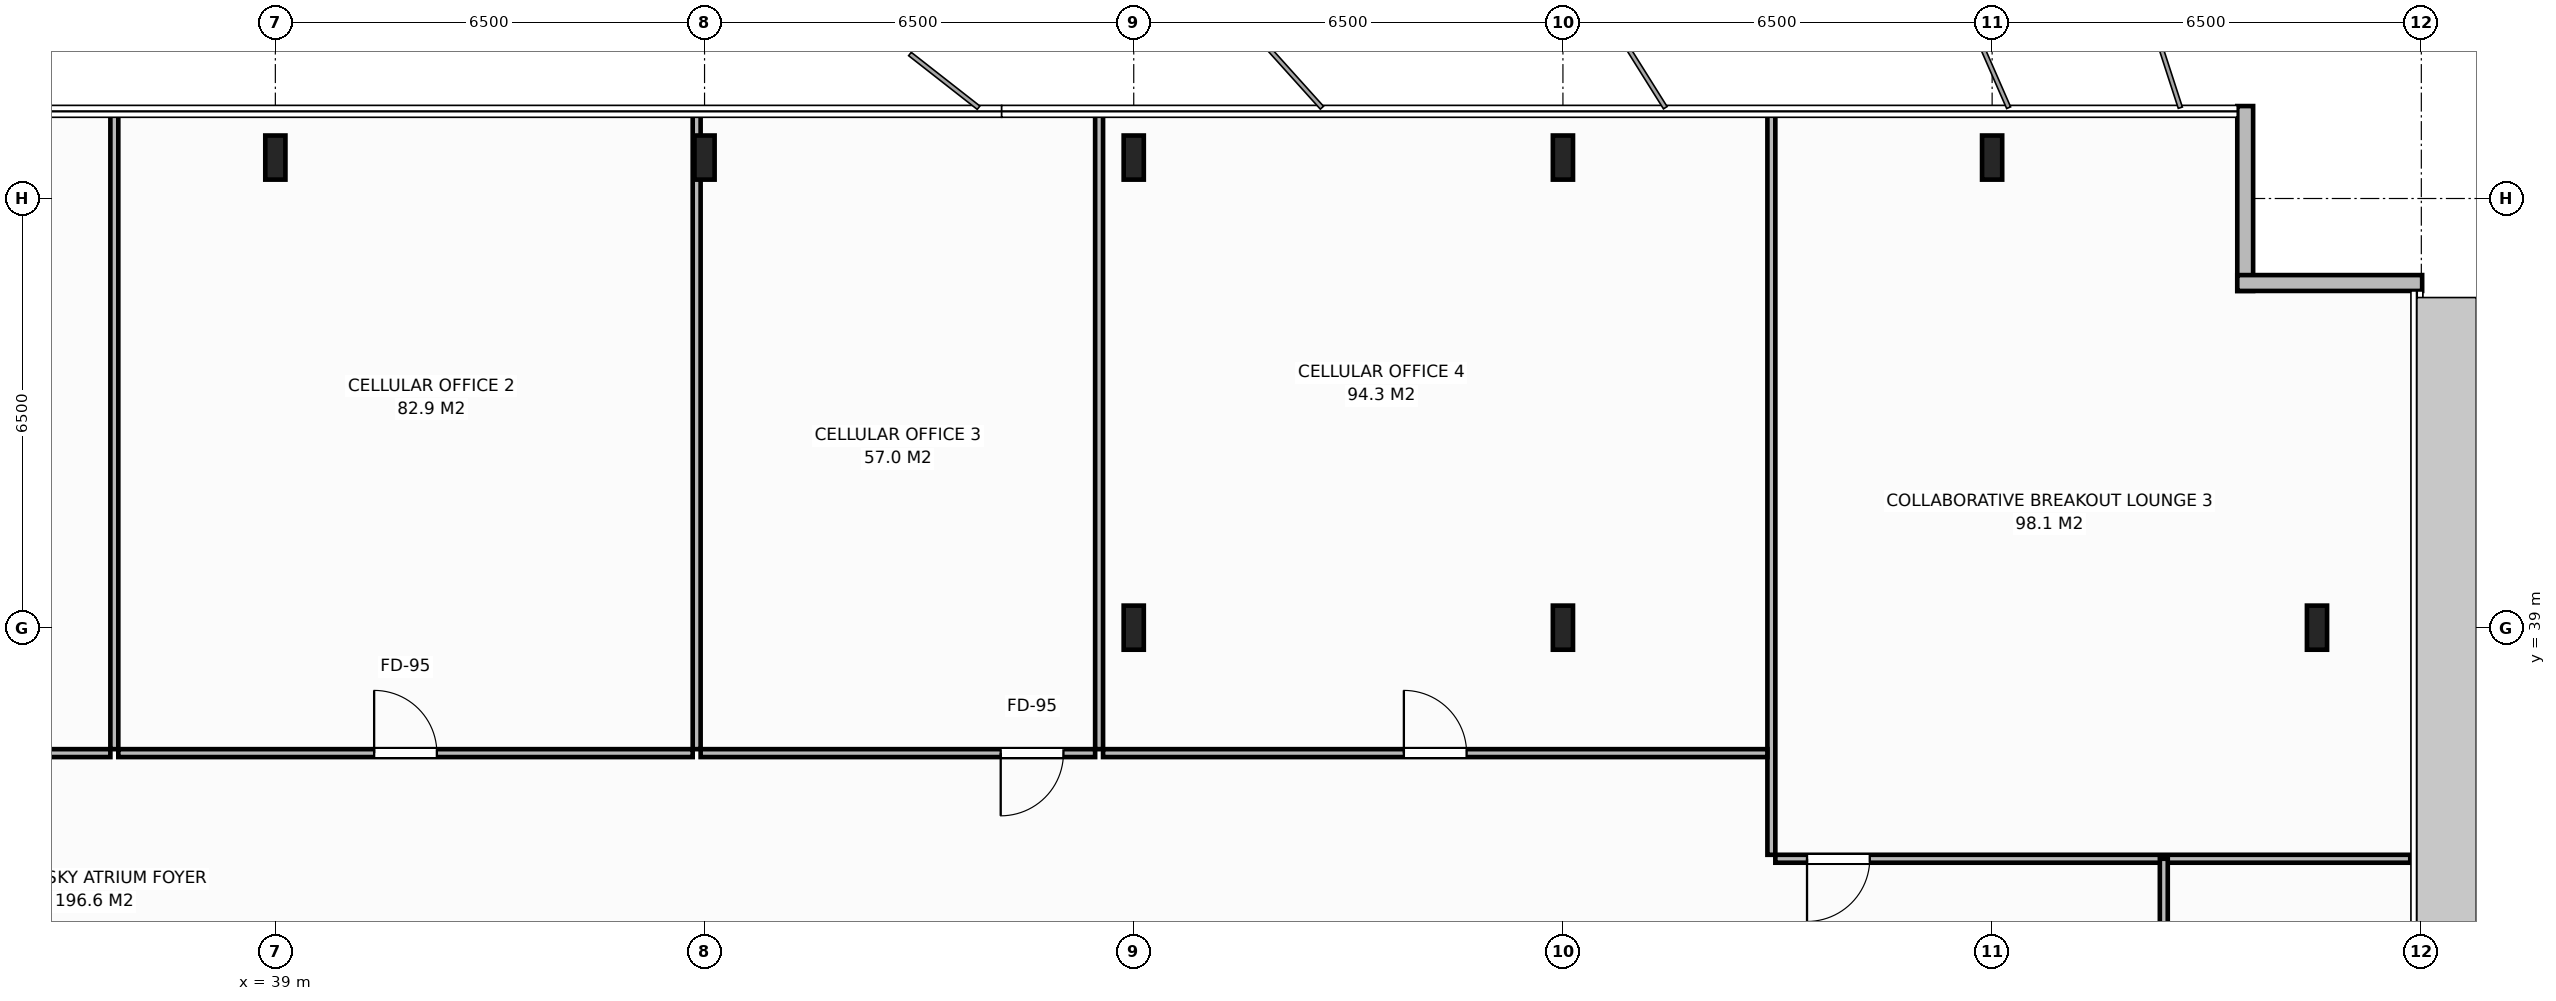
"""IFC4 building model, lengths in metres.
Left out: names, types, materials, properties, quantities, classifications, styles, units other than length and angle.
Written with IfcOpenShell. Run it as: python <this file> out.ifc"""

import sys

from ifc_helpers import new_model, si_unit, direction, frame, frame_2d, origin, origin_2d, place, context, subcontext, project, spatial, rectangle, i_section, extrude, element, fill, save


model = new_model("IFC4")
c1 = context("Model", 3, precision=1e-05, world=origin(), true_north=direction((0.0, 1.0)))
c2 = subcontext(c1, "Body", "Model", "MODEL_VIEW")
j1 = project(units=[si_unit("LENGTHUNIT", "METRE"), si_unit("PLANEANGLEUNIT", "RADIAN")], contexts=[c1])
p1 = place(None, origin())
s1 = spatial("IfcSite", under=j1, at=p1, CompositionType="ELEMENT")
p2 = place(p1, origin())
s2 = spatial("IfcBuilding", under=s1, at=p2, CompositionType="ELEMENT")
p3 = place(p2, frame((0.0, 0.0, 270.8)))
s3 = spatial("IfcBuildingStorey", under=s2, at=p3, CompositionType="ELEMENT", Elevation=270.8)
for number, where, z_axis, x_axis in (
    (1, (58.5, 39.0, 0.0), (0.0, 0.0, 1.0), (1.0, 0.0, 0.0)),
    (2, (52.0, 39.0, 0.0), (0.0, 0.0, 1.0), (1.0, 0.0, 0.0)),
    (3, (39.0, 46.12, 0.0), (0.0, 0.0, 1.0), (1.0, 0.0, 0.0)),
    (4, (45.5, 46.12, 0.0), (0.0, 0.0, 1.0), (1.0, 0.0, 0.0)),
    (5, (52.0, 46.12, 0.0), (0.0, 0.0, 1.0), (1.0, 0.0, 0.0)),
    (6, (58.5, 46.12, 0.0), (0.0, 0.0, 1.0), (1.0, 0.0, 0.0)),
    (7, (65.0, 46.12, 0.0), (0.0, 0.0, 1.0), (1.0, 0.0, 0.0)),
    (8, (69.92, 39.0, 0.0), (0.0, 0.0, 1.0), (1.0, 0.0, 0.0)),
):
    element("IfcColumn", number, at=place(p3, frame(where, z_axis=z_axis, x_axis=x_axis)), inside=s3, PredefinedType="COLUMN", context=c2, shape_type="SweptSolid", body=[
        extrude(i_section(OverallWidth=0.305, OverallDepth=0.668, WebThickness=0.021, FlangeThickness=0.04, at=origin_2d()), origin(), (0.0, 0.0, 1.0), 3.8),
    ])
p4 = place(p3, frame((68.833, 46.9, 0.0), z_axis=(0.0, 0.0, 1.0), x_axis=(0.0, -1.0, 0.0)))
e9 = element("IfcWall", 9, at=p4, inside=s3, PredefinedType="STANDARD", context=c2, shape_type="SweptSolid", body=[
    extrude(rectangle(XDim=2.8, YDim=0.24, at=frame_2d((1.4, 0.0))), origin(), (0.0, 0.0, 1.0), 3.588),
])
p5 = place(p3, frame((68.713, 44.22, 0.0), z_axis=(0.0, 0.0, 1.0), x_axis=(1.0, 0.0, 0.0)))
e10 = element("IfcWall", 10, at=p5, inside=s3, PredefinedType="STANDARD", context=c2, shape_type="SweptSolid", body=[
    extrude(rectangle(XDim=2.8, YDim=0.24, at=frame_2d((1.4, 0.0))), origin(), (0.0, 0.0, 1.0), 3.588),
])
p6 = place(p3, frame((36.562, 37.16, 0.0), z_axis=(0.0, 0.0, 1.0), x_axis=(0.0, 1.0, 0.0)))
e11 = element("IfcWall", 11, at=p6, inside=s3, PredefinedType="PARTITIONING", context=c2, shape_type="SweptSolid", body=[
    extrude(rectangle(XDim=9.72, YDim=0.12, at=frame_2d((4.86, 0.0))), origin(), (0.0, 0.0, 1.0), 3.588),
])
p7 = place(p3, frame((25.078, 37.1, 0.0), z_axis=(0.0, 0.0, 1.0), x_axis=(1.0, 0.0, 0.0)))
e12 = element("IfcWall", 12, at=p7, inside=s3, PredefinedType="PARTITIONING", context=c2, shape_type="SweptSolid", body=[
    extrude(rectangle(XDim=11.424, YDim=0.12, at=frame_2d((5.712, 0.0))), origin(), (0.0, 0.0, 1.0), 3.588),
])
p8 = place(p7, frame((5.237, 0.0, 0.0)))
e13 = element("IfcOpeningElement", 13, at=p8, cuts=e12, PredefinedType="OPENING", context=c2, shape_type="SweptSolid", body=[
    extrude(rectangle(XDim=0.95, YDim=2.15, at=frame_2d((0.475, 1.075))), frame((0.0, 0.07, 0.0), z_axis=(0.0, -1.0, 0.0), x_axis=(1.0, 0.0, 0.0)), (0.0, 0.0, 1.0), 0.14),
])
p9 = place(p3, frame((45.381, 37.16, 0.0), z_axis=(0.0, 0.0, 1.0), x_axis=(0.0, 1.0, 0.0)))
e14 = element("IfcWall", 14, at=p9, inside=s3, PredefinedType="PARTITIONING", context=c2, shape_type="SweptSolid", body=[
    extrude(rectangle(XDim=9.72, YDim=0.12, at=frame_2d((4.86, 0.0))), origin(), (0.0, 0.0, 1.0), 2.788),
])
p10 = place(p3, frame((36.622, 37.1, 0.0), z_axis=(0.0, 0.0, 1.0), x_axis=(1.0, 0.0, 0.0)))
e15 = element("IfcWall", 15, at=p10, inside=s3, PredefinedType="PARTITIONING", context=c2, shape_type="SweptSolid", body=[
    extrude(rectangle(XDim=8.699, YDim=0.12, at=frame_2d((4.35, 0.0))), origin(), (0.0, 0.0, 1.0), 3.588),
])
p11 = place(p10, frame((3.875, 0.0, 0.0)))
e16 = element("IfcOpeningElement", 16, at=p11, cuts=e15, PredefinedType="OPENING", context=c2, shape_type="SweptSolid", body=[
    extrude(rectangle(XDim=0.95, YDim=2.15, at=frame_2d((0.475, 1.075))), frame((0.0, 0.07, 0.0), z_axis=(0.0, -1.0, 0.0), x_axis=(1.0, 0.0, 0.0)), (0.0, 0.0, 1.0), 0.14),
])
p12 = place(p3, frame((51.475, 37.16, 0.0), z_axis=(0.0, 0.0, 1.0), x_axis=(0.0, 1.0, 0.0)))
e17 = element("IfcWall", 17, at=p12, inside=s3, PredefinedType="PARTITIONING", context=c2, shape_type="SweptSolid", body=[
    extrude(rectangle(XDim=9.72, YDim=0.12, at=frame_2d((4.86, 0.0))), origin(), (0.0, 0.0, 1.0), 3.588),
])
p13 = place(p3, frame((45.441, 37.1, 0.0), z_axis=(0.0, 0.0, 1.0), x_axis=(1.0, 0.0, 0.0)))
e18 = element("IfcWall", 18, at=p13, inside=s3, PredefinedType="PARTITIONING", context=c2, shape_type="SweptSolid", body=[
    extrude(rectangle(XDim=5.975, YDim=0.12, at=frame_2d((2.987, 0.0))), origin(), (0.0, 0.0, 1.0), 3.588),
])
p14 = place(p13, frame((4.545, 0.0, 0.0)))
e19 = element("IfcOpeningElement", 19, at=p14, cuts=e18, PredefinedType="OPENING", context=c2, shape_type="SweptSolid", body=[
    extrude(rectangle(XDim=0.95, YDim=2.15, at=frame_2d((0.475, 1.075))), frame((0.0, 0.07, 0.0), z_axis=(0.0, -1.0, 0.0), x_axis=(1.0, 0.0, 0.0)), (0.0, 0.0, 1.0), 0.14),
])
p15 = place(p3, frame((61.657, 35.56, 0.0), z_axis=(0.0, 0.0, 1.0), x_axis=(0.0, 1.0, 0.0)))
e20 = element("IfcWall", 20, at=p15, inside=s3, PredefinedType="PARTITIONING", context=c2, shape_type="SweptSolid", body=[
    extrude(rectangle(XDim=11.32, YDim=0.12, at=frame_2d((5.66, 0.0))), origin(), (0.0, 0.0, 1.0), 3.588),
])
p16 = place(p3, frame((51.535, 37.1, 0.0), z_axis=(0.0, 0.0, 1.0), x_axis=(1.0, 0.0, 0.0)))
e21 = element("IfcWall", 21, at=p16, inside=s3, PredefinedType="PARTITIONING", context=c2, shape_type="SweptSolid", body=[
    extrude(rectangle(XDim=10.061, YDim=0.12, at=frame_2d((5.031, 0.0))), origin(), (0.0, 0.0, 1.0), 3.588),
])
p17 = place(p16, frame((4.556, 0.0, 0.0)))
e22 = element("IfcOpeningElement", 22, at=p17, cuts=e21, PredefinedType="OPENING", context=c2, shape_type="SweptSolid", body=[
    extrude(rectangle(XDim=0.95, YDim=2.15, at=frame_2d((0.475, 1.075))), frame((0.0, 0.07, 0.0), z_axis=(0.0, -1.0, 0.0), x_axis=(1.0, 0.0, 0.0)), (0.0, 0.0, 1.0), 0.14),
])
p18 = place(p3, frame((61.717, 35.5, 0.0), z_axis=(0.0, 0.0, 1.0), x_axis=(1.0, 0.0, 0.0)))
e23 = element("IfcWall", 23, at=p18, inside=s3, PredefinedType="PARTITIONING", context=c2, shape_type="SweptSolid", body=[
    extrude(rectangle(XDim=9.616, YDim=0.12, at=frame_2d((4.808, 0.0))), origin(), (0.0, 0.0, 1.0), 3.588),
])
p19 = place(p18, frame((0.48, 0.0, 0.0)))
e24 = element("IfcOpeningElement", 24, at=p19, cuts=e23, PredefinedType="OPENING", context=c2, shape_type="SweptSolid", body=[
    extrude(rectangle(XDim=0.95, YDim=2.15, at=frame_2d((0.475, 1.075))), frame((0.0, 0.07, 0.0), z_axis=(0.0, -1.0, 0.0), x_axis=(1.0, 0.0, 0.0)), (0.0, 0.0, 1.0), 0.14),
])
p20 = place(p3, frame((67.6, 27.05, 0.0), z_axis=(0.0, 0.0, 1.0), x_axis=(0.0, 1.0, 0.0)))
e25 = element("IfcWall", 25, at=p20, inside=s3, PredefinedType="PARTITIONING", context=c2, shape_type="SweptSolid", body=[
    extrude(rectangle(XDim=8.45, YDim=0.12, at=frame_2d((4.225, 0.0))), origin(), (0.0, 0.0, 1.0), 3.588),
])
p21 = place(p20, frame((2.7, 0.0, 0.0)))
e26 = element("IfcOpeningElement", 26, at=p21, cuts=e25, PredefinedType="OPENING", context=c2, shape_type="SweptSolid", body=[
    extrude(rectangle(XDim=0.95, YDim=2.15, at=frame_2d((0.475, 1.075))), frame((0.0, 0.07, 0.0), z_axis=(0.0, -1.0, 0.0), x_axis=(1.0, 0.0, 0.0)), (0.0, 0.0, 1.0), 0.14),
])
p22 = place(p11, origin())
e27 = element("IfcDoor", 27, at=p22, inside=s3, OperationType="SINGLE_SWING_LEFT", PredefinedType="DOOR", context=c2, shape_type="SweptSolid", body=[
    extrude(rectangle(XDim=0.95, YDim=2.15, at=frame_2d((0.475, 1.075))), frame((0.0, 0.025, 0.0), z_axis=(0.0, -1.0, 0.0), x_axis=(1.0, 0.0, 0.0)), (0.0, 0.0, 1.0), 0.05),
])
fill(e16, e27)
p23 = place(p14, origin())
e28 = element("IfcDoor", 28, at=p23, inside=s3, OperationType="SINGLE_SWING_RIGHT", PredefinedType="DOOR", context=c2, shape_type="SweptSolid", body=[
    extrude(rectangle(XDim=0.95, YDim=2.15, at=frame_2d((0.475, 1.075))), frame((0.0, 0.025, 0.0), z_axis=(0.0, -1.0, 0.0), x_axis=(1.0, 0.0, 0.0)), (0.0, 0.0, 1.0), 0.05),
])
fill(e19, e28)
p24 = place(p17, origin())
e29 = element("IfcDoor", 29, at=p24, inside=s3, OperationType="SINGLE_SWING_LEFT", PredefinedType="DOOR", context=c2, shape_type="SweptSolid", body=[
    extrude(rectangle(XDim=0.95, YDim=2.15, at=frame_2d((0.475, 1.075))), frame((0.0, 0.025, 0.0), z_axis=(0.0, -1.0, 0.0), x_axis=(1.0, 0.0, 0.0)), (0.0, 0.0, 1.0), 0.05),
])
fill(e22, e29)
p25 = place(p19, origin())
e30 = element("IfcDoor", 30, at=p25, inside=s3, OperationType="SINGLE_SWING_RIGHT", PredefinedType="DOOR", context=c2, shape_type="SweptSolid", body=[
    extrude(rectangle(XDim=0.95, YDim=2.15, at=frame_2d((0.475, 1.075))), frame((0.0, 0.025, 0.0), z_axis=(0.0, -1.0, 0.0), x_axis=(1.0, 0.0, 0.0)), (0.0, 0.0, 1.0), 0.05),
])
fill(e24, e30)
save(model, sys.argv[1])
